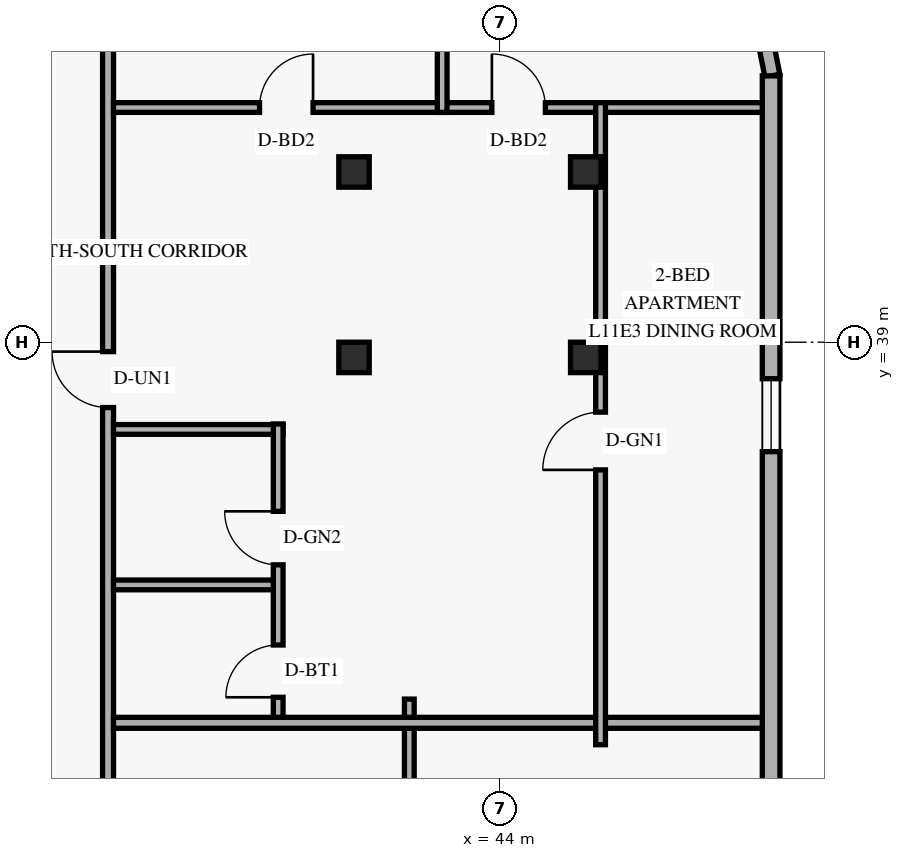
"""IFC4 building model, lengths in metres.
Left out: names, types, materials, properties, quantities, classifications, styles, units other than length and angle.
Written with IfcOpenShell. Run it as: python <this file> out.ifc"""

import sys

from ifc_helpers import new_model, si_unit, direction, frame, frame_2d, origin, origin_2d, place, context, subcontext, project, spatial, rectangle, hollow_rectangle, extrude, element, fill, save


model = new_model("IFC4")
c1 = context("Model", 3, precision=1e-05, world=origin(), true_north=direction((0.0, 1.0)))
c2 = subcontext(c1, "Body", "Model", "MODEL_VIEW")
j1 = project(units=[si_unit("LENGTHUNIT", "METRE"), si_unit("PLANEANGLEUNIT", "RADIAN")], contexts=[c1])
p1 = place(None, origin())
s1 = spatial("IfcSite", under=j1, at=p1, CompositionType="ELEMENT")
p2 = place(p1, origin())
s2 = spatial("IfcBuilding", under=s1, at=p2, CompositionType="ELEMENT")
p3 = place(p2, frame((0.0, 0.0, 45.6)))
s3 = spatial("IfcBuildingStorey", under=s2, at=p3, CompositionType="ELEMENT", Elevation=45.6)
for number, where, z_axis, x_axis in (
    (1, (41.532, 38.75, 0.0), (0.035, 0.0, 0.999), (0.0, 1.0, 0.0)),
    (2, (41.532, 41.8, 0.0), (0.035, 0.0, 0.999), (0.0, 1.0, 0.0)),
):
    element("IfcColumn", number, at=place(p3, frame(where, z_axis=z_axis, x_axis=x_axis)), inside=s3, PredefinedType="COLUMN", context=c2, shape_type="SweptSolid", body=[
        extrude(hollow_rectangle(XDim=0.5, YDim=0.5, WallThickness=0.022, at=origin_2d()), origin(), (0.0, 0.0, 1.0), 3.602),
    ])
for number, where, z_axis, x_axis in (
    (3, (45.302, 38.75, 0.0), (0.058, 0.0, 0.998), (0.0, 1.0, 0.0)),
    (4, (45.302, 41.8, 0.0), (0.058, 0.0, 0.998), (0.0, 1.0, 0.0)),
):
    element("IfcColumn", number, at=place(p3, frame(where, z_axis=z_axis, x_axis=x_axis)), inside=s3, PredefinedType="COLUMN", context=c2, shape_type="SweptSolid", body=[
        extrude(hollow_rectangle(XDim=0.5, YDim=0.5, WallThickness=0.022, at=origin_2d()), origin(), (0.0, 0.0, 1.0), 3.606),
    ])
p4 = place(p3, frame((48.476, 43.384, 0.0), z_axis=(0.0, 0.0, 1.0), x_axis=(-0.19496651342, 0.980809899341, 0.0)))
e5 = element("IfcWall", 5, at=p4, inside=s3, PredefinedType="SOLIDWALL", context=c2, shape_type="SweptSolid", body=[
    extrude(rectangle(XDim=1.389, YDim=0.25, at=frame_2d((0.694, 0.0))), origin(), (0.0, 0.0, 1.0), 3.36),
])
p5 = place(p3, frame((48.455, 4.62, 0.0), z_axis=(0.0, 0.0, 1.0), x_axis=(0.0, 1.0, 0.0)))
e6 = element("IfcWall", 6, at=p5, inside=s3, PredefinedType="SOLIDWALL", context=c2, shape_type="SweptSolid", body=[
    extrude(rectangle(XDim=38.76, YDim=0.29, at=frame_2d((19.38, 0.0))), origin(), (0.0, 0.0, 1.0), 3.36),
])
p6 = place(p5, frame((5.64, 0.0, 0.85)))
e7 = element("IfcOpeningElement", 7, at=p6, cuts=e6, PredefinedType="OPENING", context=c2, shape_type="SweptSolid", body=[
    extrude(rectangle(XDim=1.2, YDim=1.5, at=frame_2d((0.6, 0.75))), frame((0.0, 0.155, 0.0), z_axis=(0.0, -1.0, 0.0), x_axis=(1.0, 0.0, 0.0)), (0.0, 0.0, 1.0), 0.31),
])
p7 = place(p5, frame((13.784, 0.0, 0.85)))
e8 = element("IfcOpeningElement", 8, at=p7, cuts=e6, PredefinedType="OPENING", context=c2, shape_type="SweptSolid", body=[
    extrude(rectangle(XDim=1.2, YDim=1.5, at=frame_2d((0.6, 0.75))), frame((0.0, 0.155, 0.0), z_axis=(0.0, -1.0, 0.0), x_axis=(1.0, 0.0, 0.0)), (0.0, 0.0, 1.0), 0.31),
])
p8 = place(p5, frame((19.359, 0.0, 0.85)))
e9 = element("IfcOpeningElement", 9, at=p8, cuts=e6, PredefinedType="OPENING", context=c2, shape_type="SweptSolid", body=[
    extrude(rectangle(XDim=1.2, YDim=1.5, at=frame_2d((0.6, 0.75))), frame((0.0, 0.155, 0.0), z_axis=(0.0, -1.0, 0.0), x_axis=(1.0, 0.0, 0.0)), (0.0, 0.0, 1.0), 0.31),
])
p9 = place(p5, frame((25.275, 0.0, 0.85)))
e10 = element("IfcOpeningElement", 10, at=p9, cuts=e6, PredefinedType="OPENING", context=c2, shape_type="SweptSolid", body=[
    extrude(rectangle(XDim=1.2, YDim=1.5, at=frame_2d((0.6, 0.75))), frame((0.0, 0.155, 0.0), z_axis=(0.0, -1.0, 0.0), x_axis=(1.0, 0.0, 0.0)), (0.0, 0.0, 1.0), 0.31),
])
p10 = place(p5, frame((32.58, 0.0, 0.85)))
e11 = element("IfcOpeningElement", 11, at=p10, cuts=e6, PredefinedType="OPENING", context=c2, shape_type="SweptSolid", body=[
    extrude(rectangle(XDim=1.2, YDim=1.5, at=frame_2d((0.6, 0.75))), frame((0.0, 0.155, 0.0), z_axis=(0.0, -1.0, 0.0), x_axis=(1.0, 0.0, 0.0)), (0.0, 0.0, 1.0), 0.31),
])
p11 = place(p3, frame((37.55, 1.29, 0.0), z_axis=(0.0, 0.0, 1.0), x_axis=(0.0, 1.0, 0.0)))
e12 = element("IfcWall", 12, at=p11, inside=s3, PredefinedType="STANDARD", context=c2, shape_type="SweptSolid", body=[
    extrude(rectangle(XDim=45.42, YDim=0.18, at=frame_2d((22.71, 0.0))), origin(), (0.0, 0.0, 1.0), 2.649),
])
p12 = place(p11, frame((13.943, 0.0, 0.0)))
e13 = element("IfcOpeningElement", 13, at=p12, cuts=e12, PredefinedType="OPENING", context=c2, shape_type="SweptSolid", body=[
    extrude(rectangle(XDim=0.92, YDim=2.15, at=frame_2d((0.46, 1.075))), frame((0.0, 0.1, 0.0), z_axis=(0.0, -1.0, 0.0), x_axis=(1.0, 0.0, 0.0)), (0.0, 0.0, 1.0), 0.2),
])
p13 = place(p11, frame((20.953, 0.0, 0.0)))
e14 = element("IfcOpeningElement", 14, at=p13, cuts=e12, PredefinedType="OPENING", context=c2, shape_type="SweptSolid", body=[
    extrude(rectangle(XDim=0.92, YDim=2.15, at=frame_2d((0.46, 1.075))), frame((0.0, 0.1, 0.0), z_axis=(0.0, -1.0, 0.0), x_axis=(1.0, 0.0, 0.0)), (0.0, 0.0, 1.0), 0.2),
])
p14 = place(p11, frame((36.635, 0.0, 0.0)))
e15 = element("IfcOpeningElement", 15, at=p14, cuts=e12, PredefinedType="OPENING", context=c2, shape_type="SweptSolid", body=[
    extrude(rectangle(XDim=0.92, YDim=2.15, at=frame_2d((0.46, 1.075))), frame((0.0, 0.1, 0.0), z_axis=(0.0, -1.0, 0.0), x_axis=(1.0, 0.0, 0.0)), (0.0, 0.0, 1.0), 0.2),
])
p15 = place(p3, frame((42.504, 28.17, 0.0), z_axis=(0.0, 0.0, 1.0), x_axis=(0.0, 1.0, 0.0)))
e16 = element("IfcWall", 16, at=p15, inside=s3, PredefinedType="PARTITIONING", context=c2, shape_type="SweptSolid", body=[
    extrude(rectangle(XDim=4.96, YDim=0.16, at=frame_2d((2.48, 0.0))), origin(), (0.0, 0.0, 1.0), 2.649),
])
p16 = place(p3, frame((37.64, 32.74, 0.0), z_axis=(0.0, 0.0, 1.0), x_axis=(1.0, 0.0, 0.0)))
e17 = element("IfcWall", 17, at=p16, inside=s3, PredefinedType="PARTITIONING", context=c2, shape_type="SweptSolid", body=[
    extrude(rectangle(XDim=10.67, YDim=0.18, at=frame_2d((5.335, 0.0))), origin(), (0.0, 0.0, 1.0), 2.649),
])
p17 = place(p3, frame((37.64, 42.86, 0.0), z_axis=(0.0, 0.0, 1.0), x_axis=(1.0, 0.0, 0.0)))
e18 = element("IfcWall", 18, at=p17, inside=s3, PredefinedType="PARTITIONING", context=c2, shape_type="SweptSolid", body=[
    extrude(rectangle(XDim=10.67, YDim=0.16, at=frame_2d((5.335, 0.0))), origin(), (0.0, 0.0, 1.0), 3.36),
])
p18 = place(p17, frame((2.402, 0.0, 0.0)))
e19 = element("IfcOpeningElement", 19, at=p18, cuts=e18, PredefinedType="OPENING", context=c2, shape_type="SweptSolid", body=[
    extrude(rectangle(XDim=0.88, YDim=2.14, at=frame_2d((0.44, 1.07))), frame((0.0, 0.09, 0.0), z_axis=(0.0, -1.0, 0.0), x_axis=(1.0, 0.0, 0.0)), (0.0, 0.0, 1.0), 0.18),
])
p19 = place(p17, frame((6.222, 0.0, 0.0)))
e20 = element("IfcOpeningElement", 20, at=p19, cuts=e18, PredefinedType="OPENING", context=c2, shape_type="SweptSolid", body=[
    extrude(rectangle(XDim=0.88, YDim=2.14, at=frame_2d((0.44, 1.07))), frame((0.0, 0.09, 0.0), z_axis=(0.0, -1.0, 0.0), x_axis=(1.0, 0.0, 0.0)), (0.0, 0.0, 1.0), 0.18),
])
p20 = place(p3, frame((37.64, 37.565, 0.0), z_axis=(0.0, 0.0, 1.0), x_axis=(1.0, 0.0, 0.0)))
e21 = element("IfcWall", 21, at=p20, inside=s3, PredefinedType="PLUMBINGWALL", context=c2, shape_type="SweptSolid", body=[
    extrude(rectangle(XDim=2.788, YDim=0.16, at=frame_2d((1.394, 0.0))), origin(), (0.0, 0.0, 1.0), 3.36),
])
p21 = place(p3, frame((40.348, 32.83, 0.0), z_axis=(0.0, 0.0, 1.0), x_axis=(0.0, 1.0, 0.0)))
e22 = element("IfcWall", 22, at=p21, inside=s3, PredefinedType="PLUMBINGWALL", context=c2, shape_type="SweptSolid", body=[
    extrude(rectangle(XDim=4.825, YDim=0.16, at=frame_2d((2.413, 0.0))), origin(), (0.0, 0.0, 1.0), 2.932),
])
p22 = place(p21, frame((0.33, 0.0, 0.0)))
e23 = element("IfcOpeningElement", 23, at=p22, cuts=e22, PredefinedType="OPENING", context=c2, shape_type="SweptSolid", body=[
    extrude(rectangle(XDim=0.86, YDim=2.12, at=frame_2d((0.43, 1.06))), frame((0.0, 0.09, 0.0), z_axis=(0.0, -1.0, 0.0), x_axis=(1.0, 0.0, 0.0)), (0.0, 0.0, 1.0), 0.18),
])
p23 = place(p21, frame((2.508, 0.0, 0.0)))
e24 = element("IfcOpeningElement", 24, at=p23, cuts=e22, PredefinedType="OPENING", context=c2, shape_type="SweptSolid", body=[
    extrude(rectangle(XDim=0.88, YDim=2.12, at=frame_2d((0.44, 1.06))), frame((0.0, 0.09, 0.0), z_axis=(0.0, -1.0, 0.0), x_axis=(1.0, 0.0, 0.0)), (0.0, 0.0, 1.0), 0.18),
])
p24 = place(p3, frame((37.64, 35.008, 0.0), z_axis=(0.0, 0.0, 1.0), x_axis=(1.0, 0.0, 0.0)))
e25 = element("IfcWall", 25, at=p24, inside=s3, PredefinedType="PLUMBINGWALL", context=c2, shape_type="SweptSolid", body=[
    extrude(rectangle(XDim=2.628, YDim=0.16, at=frame_2d((1.314, 0.0))), origin(), (0.0, 0.0, 1.0), 3.36),
])
p25 = place(p3, frame((45.65, 32.38, 0.0), z_axis=(0.0, 0.0, 1.0), x_axis=(0.0, 1.0, 0.0)))
e26 = element("IfcWall", 26, at=p25, inside=s3, PredefinedType="PARTITIONING", context=c2, shape_type="SweptSolid", body=[
    extrude(rectangle(XDim=10.56, YDim=0.16, at=frame_2d((5.28, 0.0))), origin(), (0.0, 0.0, 1.0), 2.809),
])
p26 = place(p25, frame((4.52, 0.0, 0.0)))
e27 = element("IfcOpeningElement", 27, at=p26, cuts=e26, PredefinedType="OPENING", context=c2, shape_type="SweptSolid", body=[
    extrude(rectangle(XDim=0.95, YDim=2.15, at=frame_2d((0.475, 1.075))), frame((0.0, 0.09, 0.0), z_axis=(0.0, -1.0, 0.0), x_axis=(1.0, 0.0, 0.0)), (0.0, 0.0, 1.0), 0.18),
])
p27 = place(p3, frame((43.045, 42.78, 0.0), z_axis=(0.0, 0.0, 1.0), x_axis=(0.0, 1.0, 0.0)))
e28 = element("IfcWall", 28, at=p27, inside=s3, PredefinedType="PARTITIONING", context=c2, shape_type="SweptSolid", body=[
    extrude(rectangle(XDim=3.93, YDim=0.16, at=frame_2d((1.965, 0.0))), origin(), (0.0, 0.0, 1.0), 3.36),
])
p28 = place(p10, origin())
e29 = element("IfcWindow", 29, at=p28, inside=s3, PartitioningType="SINGLE_PANEL", PredefinedType="WINDOW", context=c2, shape_type="SweptSolid", body=[
    extrude(rectangle(XDim=1.2, YDim=1.5, at=frame_2d((0.6, 0.75))), frame((0.0, 0.03, 0.0), z_axis=(0.0, -1.0, 0.0), x_axis=(1.0, 0.0, 0.0)), (0.0, 0.0, 1.0), 0.06),
])
fill(e11, e29)
p29 = place(p26, origin())
e30 = element("IfcDoor", 30, at=p29, inside=s3, OperationType="SINGLE_SWING_LEFT", PredefinedType="DOOR", context=c2, shape_type="SweptSolid", body=[
    extrude(rectangle(XDim=0.95, YDim=2.15, at=frame_2d((0.475, 1.075))), frame((0.0, 0.025, 0.0), z_axis=(0.0, -1.0, 0.0), x_axis=(1.0, 0.0, 0.0)), (0.0, 0.0, 1.0), 0.05),
])
fill(e27, e30)
p30 = place(p14, origin())
e31 = element("IfcDoor", 31, at=p30, inside=s3, OperationType="SINGLE_SWING_RIGHT", PredefinedType="DOOR", context=c2, shape_type="SweptSolid", body=[
    extrude(rectangle(XDim=0.92, YDim=2.15, at=frame_2d((0.46, 1.075))), frame((0.0, 0.025, 0.0), z_axis=(0.0, -1.0, 0.0), x_axis=(1.0, 0.0, 0.0)), (0.0, 0.0, 1.0), 0.05),
])
fill(e15, e31)
p31 = place(p22, origin())
e32 = element("IfcDoor", 32, at=p31, inside=s3, OperationType="SINGLE_SWING_LEFT", PredefinedType="DOOR", context=c2, shape_type="SweptSolid", body=[
    extrude(rectangle(XDim=0.86, YDim=2.12, at=frame_2d((0.43, 1.06))), frame((0.0, 0.025, 0.0), z_axis=(0.0, -1.0, 0.0), x_axis=(1.0, 0.0, 0.0)), (0.0, 0.0, 1.0), 0.05),
])
fill(e23, e32)
p32 = place(p23, origin())
e33 = element("IfcDoor", 33, at=p32, inside=s3, OperationType="SINGLE_SWING_RIGHT", PredefinedType="DOOR", context=c2, shape_type="SweptSolid", body=[
    extrude(rectangle(XDim=0.88, YDim=2.12, at=frame_2d((0.44, 1.06))), frame((0.0, 0.025, 0.0), z_axis=(0.0, -1.0, 0.0), x_axis=(1.0, 0.0, 0.0)), (0.0, 0.0, 1.0), 0.05),
])
fill(e24, e33)
p33 = place(p18, origin())
e34 = element("IfcDoor", 34, at=p33, inside=s3, OperationType="SINGLE_SWING_RIGHT", PredefinedType="DOOR", context=c2, shape_type="SweptSolid", body=[
    extrude(rectangle(XDim=0.88, YDim=2.14, at=frame_2d((0.44, 1.07))), frame((0.0, 0.025, 0.0), z_axis=(0.0, -1.0, 0.0), x_axis=(1.0, 0.0, 0.0)), (0.0, 0.0, 1.0), 0.05),
])
fill(e19, e34)
p34 = place(p19, origin())
e35 = element("IfcDoor", 35, at=p34, inside=s3, OperationType="SINGLE_SWING_LEFT", PredefinedType="DOOR", context=c2, shape_type="SweptSolid", body=[
    extrude(rectangle(XDim=0.88, YDim=2.14, at=frame_2d((0.44, 1.07))), frame((0.0, 0.025, 0.0), z_axis=(0.0, -1.0, 0.0), x_axis=(1.0, 0.0, 0.0)), (0.0, 0.0, 1.0), 0.05),
])
fill(e20, e35)
save(model, sys.argv[1])
